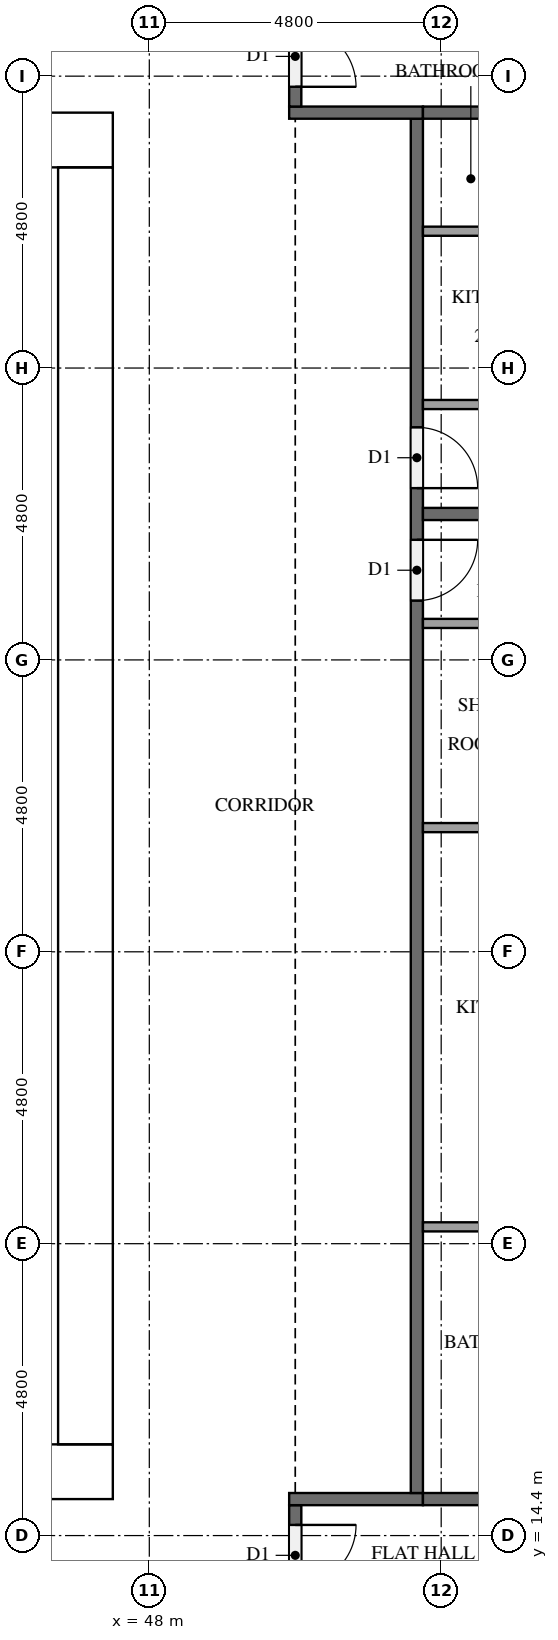
"""IFC4 building model, lengths in metres.
Left out: names, types, materials, properties, quantities, classifications, styles, units other than length and angle.
Written with IfcOpenShell. Run it as: python <this file> out.ifc"""

import sys

from ifc_helpers import new_model, si_unit, direction, frame, frame_2d, origin, place, context, subcontext, project, spatial, rectangle, extrude, element, fill, save


model = new_model("IFC4")
c1 = context("Model", 3, precision=1e-05, world=origin(), true_north=direction((0.0, 1.0)))
c2 = subcontext(c1, "Body", "Model", "MODEL_VIEW")
j1 = project(units=[si_unit("LENGTHUNIT", "METRE"), si_unit("PLANEANGLEUNIT", "RADIAN")], contexts=[c1])
p1 = place(None, origin())
s1 = spatial("IfcSite", under=j1, at=p1, CompositionType="ELEMENT")
p2 = place(p1, origin())
s2 = spatial("IfcBuilding", under=s1, at=p2, CompositionType="ELEMENT")
p3 = place(p2, frame((0.0, 0.0, 103.2)))
s3 = spatial("IfcBuildingStorey", under=s2, at=p3, CompositionType="ELEMENT", Elevation=103.2)
p4 = place(p3, frame((15.0, 15.45, 0.0), z_axis=(0.0, 0.0, 1.0), x_axis=(1.0, 0.0, 0.0)))
e1 = element("IfcWall", 1, at=p4, inside=s3, PredefinedType="SHEAR", context=c2, shape_type="SweptSolid", body=[
    extrude(rectangle(XDim=32.4, YDim=0.9, at=frame_2d((16.2, 0.0))), origin(), (0.0, 0.0, 1.0), 3.2),
])
p5 = place(p4, frame((15.3, 0.0, 0.0)))
e2 = element("IfcOpeningElement", 2, at=p5, cuts=e1, PredefinedType="OPENING", context=c2, shape_type="SweptSolid", body=[
    extrude(rectangle(XDim=1.8, YDim=2.1, at=frame_2d((0.9, 1.05))), frame((0.0, 0.46, 0.0), z_axis=(0.0, -1.0, 0.0), x_axis=(1.0, 0.0, 0.0)), (0.0, 0.0, 1.0), 0.92),
])
p6 = place(p3, frame((15.0, 37.35, 0.0), z_axis=(0.0, 0.0, 1.0), x_axis=(1.0, 0.0, 0.0)))
e3 = element("IfcWall", 3, at=p6, inside=s3, PredefinedType="SHEAR", context=c2, shape_type="SweptSolid", body=[
    extrude(rectangle(XDim=32.4, YDim=0.9, at=frame_2d((16.2, 0.0))), origin(), (0.0, 0.0, 1.0), 3.2),
])
p7 = place(p6, frame((15.3, 0.0, 0.0)))
e4 = element("IfcOpeningElement", 4, at=p7, cuts=e3, PredefinedType="OPENING", context=c2, shape_type="SweptSolid", body=[
    extrude(rectangle(XDim=1.8, YDim=2.1, at=frame_2d((0.9, 1.05))), frame((0.0, 0.46, 0.0), z_axis=(0.0, -1.0, 0.0), x_axis=(1.0, 0.0, 0.0)), (0.0, 0.0, 1.0), 0.92),
])
p8 = place(p6, frame((1.794, 0.0, 0.0)))
e5 = element("IfcOpeningElement", 5, at=p8, cuts=e3, PredefinedType="OPENING", context=c2, shape_type="SweptSolid", body=[
    extrude(rectangle(XDim=1.0, YDim=2.1, at=frame_2d((0.5, 1.05))), frame((0.0, 0.46, 0.0), z_axis=(0.0, -1.0, 0.0), x_axis=(1.0, 0.0, 0.0)), (0.0, 0.0, 1.0), 0.92),
])
p9 = place(p6, frame((5.331, 0.0, 0.0)))
e6 = element("IfcOpeningElement", 6, at=p9, cuts=e3, PredefinedType="OPENING", context=c2, shape_type="SweptSolid", body=[
    extrude(rectangle(XDim=1.0, YDim=2.1, at=frame_2d((0.5, 1.05))), frame((0.0, 0.46, 0.0), z_axis=(0.0, -1.0, 0.0), x_axis=(1.0, 0.0, 0.0)), (0.0, 0.0, 1.0), 0.92),
])
p10 = place(p3, frame((46.95, 15.9, 0.0), z_axis=(0.0, 0.0, 1.0), x_axis=(0.0, 1.0, 0.0)))
e7 = element("IfcWall", 7, at=p10, inside=s3, PredefinedType="SHEAR", context=c2, shape_type="SweptSolid", body=[
    extrude(rectangle(XDim=21.0, YDim=0.9, at=frame_2d((10.5, 0.0))), origin(), (0.0, 0.0, 1.0), 3.2),
])
p11 = place(p10, frame((10.2, 0.0, 0.0)))
e8 = element("IfcOpeningElement", 8, at=p11, cuts=e7, PredefinedType="OPENING", context=c2, shape_type="SweptSolid", body=[
    extrude(rectangle(XDim=1.2, YDim=2.1, at=frame_2d((0.6, 1.05))), frame((0.0, 0.46, 0.0), z_axis=(0.0, -1.0, 0.0), x_axis=(1.0, 0.0, 0.0)), (0.0, 0.0, 1.0), 0.92),
])
p12 = place(p3, frame((50.4, 14.9, 0.0), z_axis=(0.0, 0.0, 1.0), x_axis=(0.0, -1.0, 0.0)))
e9 = element("IfcWall", 9, at=p12, inside=s3, PredefinedType="PARTITIONING", context=c2, shape_type="SweptSolid", body=[
    extrude(rectangle(XDim=2.8, YDim=0.2, at=frame_2d((1.4, 0.0))), origin(), (0.0, 0.0, 1.0), 3.2),
])
p13 = place(p12, frame((0.325, 0.0, 0.0)))
e10 = element("IfcOpeningElement", 10, at=p13, cuts=e9, PredefinedType="OPENING", context=c2, shape_type="SweptSolid", body=[
    extrude(rectangle(XDim=1.0, YDim=2.1, at=frame_2d((0.5, 1.05))), frame((0.0, 0.11, 0.0), z_axis=(0.0, -1.0, 0.0), x_axis=(1.0, 0.0, 0.0)), (0.0, 0.0, 1.0), 0.22),
])
p14 = place(p3, frame((50.3, 15.0, 0.0), z_axis=(0.0, 0.0, 1.0), x_axis=(1.0, 0.0, 0.0)))
e11 = element("IfcWall", 11, at=p14, inside=s3, PredefinedType="PARTITIONING", context=c2, shape_type="SweptSolid", body=[
    extrude(rectangle(XDim=2.2, YDim=0.2, at=frame_2d((1.1, 0.0))), origin(), (0.0, 0.0, 1.0), 3.2),
])
p15 = place(p3, frame((52.4, 37.7, 0.0), z_axis=(0.0, 0.0, 1.0), x_axis=(0.0, -1.0, 0.0)))
e12 = element("IfcWall", 12, at=p15, inside=s3, PredefinedType="PARTITIONING", context=c2, shape_type="SweptSolid", body=[
    extrude(rectangle(XDim=22.6, YDim=0.2, at=frame_2d((11.3, 0.0))), origin(), (0.0, 0.0, 1.0), 3.2),
])
p16 = place(p15, frame((6.925, 0.0, 0.0)))
e13 = element("IfcOpeningElement", 13, at=p16, cuts=e12, PredefinedType="OPENING", context=c2, shape_type="SweptSolid", body=[
    extrude(rectangle(XDim=1.0, YDim=2.1, at=frame_2d((0.5, 1.05))), frame((0.0, 0.11, 0.0), z_axis=(0.0, -1.0, 0.0), x_axis=(1.0, 0.0, 0.0)), (0.0, 0.0, 1.0), 0.22),
])
p17 = place(p15, frame((5.075, 0.0, 0.0)))
e14 = element("IfcOpeningElement", 14, at=p17, cuts=e12, PredefinedType="OPENING", context=c2, shape_type="SweptSolid", body=[
    extrude(rectangle(XDim=1.0, YDim=2.1, at=frame_2d((0.5, 1.05))), frame((0.0, 0.11, 0.0), z_axis=(0.0, -1.0, 0.0), x_axis=(1.0, 0.0, 0.0)), (0.0, 0.0, 1.0), 0.22),
])
p18 = place(p3, frame((52.5, 37.8, 0.0), z_axis=(0.0, 0.0, 1.0), x_axis=(-1.0, 0.0, 0.0)))
e15 = element("IfcWall", 15, at=p18, inside=s3, PredefinedType="PARTITIONING", context=c2, shape_type="SweptSolid", body=[
    extrude(rectangle(XDim=2.2, YDim=0.2, at=frame_2d((1.1, 0.0))), origin(), (0.0, 0.0, 1.0), 3.2),
])
p19 = place(p3, frame((50.4, 40.7, 0.0), z_axis=(0.0, 0.0, 1.0), x_axis=(0.0, -1.0, 0.0)))
e16 = element("IfcWall", 16, at=p19, inside=s3, PredefinedType="PARTITIONING", context=c2, shape_type="SweptSolid", body=[
    extrude(rectangle(XDim=2.8, YDim=0.2, at=frame_2d((1.4, 0.0))), origin(), (0.0, 0.0, 1.0), 3.2),
])
p20 = place(p19, frame((1.475, 0.0, 0.0)))
e17 = element("IfcOpeningElement", 17, at=p20, cuts=e16, PredefinedType="OPENING", context=c2, shape_type="SweptSolid", body=[
    extrude(rectangle(XDim=1.0, YDim=2.1, at=frame_2d((0.5, 1.05))), frame((0.0, 0.11, 0.0), z_axis=(0.0, -1.0, 0.0), x_axis=(1.0, 0.0, 0.0)), (0.0, 0.0, 1.0), 0.22),
])
for number, where, z_axis, x_axis in (
    (18, (52.5, 15.0, 0.0), (0.0, 0.0, 1.0), (1.0, 0.0, 0.0)),
    (19, (52.5, 31.2, 0.0), (0.0, 0.0, 1.0), (1.0, 0.0, 0.0)),
):
    element("IfcWall", number, at=place(p3, frame(where, z_axis=z_axis, x_axis=x_axis)), inside=s3, PredefinedType="PARTITIONING", context=c2, shape_type="SweptSolid", body=[
        extrude(rectangle(XDim=9.8, YDim=0.2, at=frame_2d((4.9, 0.0))), origin(), (0.0, 0.0, 1.0), 3.2),
    ])
p21 = place(p3, frame((52.5, 37.8, 0.0), z_axis=(0.0, 0.0, 1.0), x_axis=(1.0, 0.0, 0.0)))
e20 = element("IfcWall", 20, at=p21, inside=s3, PredefinedType="PARTITIONING", context=c2, shape_type="SweptSolid", body=[
    extrude(rectangle(XDim=9.475, YDim=0.2, at=frame_2d((4.738, 0.0))), origin(), (0.0, 0.0, 1.0), 3.2),
])
for number, where, z_axis, x_axis in (
    (21, (52.5, 26.042, 0.0), (0.0, 0.0, 1.0), (1.0, 0.0, 0.0)),
    (22, (52.5, 19.477, 0.0), (0.0, 0.0, 1.0), (1.0, 0.0, 0.0)),
):
    element("IfcWall", number, at=place(p3, frame(where, z_axis=z_axis, x_axis=x_axis)), inside=s3, PredefinedType="PARTITIONING", context=c2, shape_type="SweptSolid", body=[
        extrude(rectangle(XDim=2.475, YDim=0.15, at=frame_2d((1.238, 0.0))), origin(), (0.0, 0.0, 1.0), 3.2),
    ])
p22 = place(p3, frame((52.5, 29.4, 0.0), z_axis=(0.0, 0.0, 1.0), x_axis=(1.0, 0.0, 0.0)))
e23 = element("IfcWall", 23, at=p22, inside=s3, PredefinedType="PARTITIONING", context=c2, shape_type="SweptSolid", body=[
    extrude(rectangle(XDim=2.625, YDim=0.15, at=frame_2d((1.312, 0.0))), origin(), (0.0, 0.0, 1.0), 3.2),
])
p23 = place(p3, frame((52.5, 35.85, 0.0), z_axis=(0.0, 0.0, 1.0), x_axis=(1.0, 0.0, 0.0)))
e24 = element("IfcWall", 24, at=p23, inside=s3, PredefinedType="PARTITIONING", context=c2, shape_type="SweptSolid", body=[
    extrude(rectangle(XDim=2.325, YDim=0.15, at=frame_2d((1.163, 0.0))), origin(), (0.0, 0.0, 1.0), 3.2),
])
p24 = place(p3, frame((52.5, 33.0, 0.0), z_axis=(0.0, 0.0, 1.0), x_axis=(1.0, 0.0, 0.0)))
e25 = element("IfcWall", 25, at=p24, inside=s3, PredefinedType="PARTITIONING", context=c2, shape_type="SweptSolid", body=[
    extrude(rectangle(XDim=2.475, YDim=0.15, at=frame_2d((1.238, 0.0))), origin(), (0.0, 0.0, 1.0), 3.2),
])
p25 = place(p11, origin())
e26 = element("IfcDoor", 26, at=p25, inside=s3, OperationType="SINGLE_SWING_RIGHT", PredefinedType="DOOR", context=c2, shape_type="SweptSolid", body=[
    extrude(rectangle(XDim=1.2, YDim=2.1, at=frame_2d((0.6, 1.05))), frame((0.0, 0.025, 0.0), z_axis=(0.0, -1.0, 0.0), x_axis=(1.0, 0.0, 0.0)), (0.0, 0.0, 1.0), 0.05),
])
fill(e8, e26)
p26 = place(p13, origin())
e27 = element("IfcDoor", 27, at=p26, inside=s3, OperationType="SINGLE_SWING_LEFT", PredefinedType="DOOR", context=c2, shape_type="SweptSolid", body=[
    extrude(rectangle(XDim=1.0, YDim=2.1, at=frame_2d((0.5, 1.05))), frame((0.0, 0.025, 0.0), z_axis=(0.0, -1.0, 0.0), x_axis=(1.0, 0.0, 0.0)), (0.0, 0.0, 1.0), 0.05),
])
fill(e10, e27)
p27 = place(p16, origin())
e28 = element("IfcDoor", 28, at=p27, inside=s3, OperationType="SINGLE_SWING_LEFT", PredefinedType="DOOR", context=c2, shape_type="SweptSolid", body=[
    extrude(rectangle(XDim=1.0, YDim=2.1, at=frame_2d((0.5, 1.05))), frame((0.0, 0.025, 0.0), z_axis=(0.0, -1.0, 0.0), x_axis=(1.0, 0.0, 0.0)), (0.0, 0.0, 1.0), 0.05),
])
fill(e13, e28)
p28 = place(p17, origin())
e29 = element("IfcDoor", 29, at=p28, inside=s3, OperationType="SINGLE_SWING_RIGHT", PredefinedType="DOOR", context=c2, shape_type="SweptSolid", body=[
    extrude(rectangle(XDim=1.0, YDim=2.1, at=frame_2d((0.5, 1.05))), frame((0.0, 0.025, 0.0), z_axis=(0.0, -1.0, 0.0), x_axis=(1.0, 0.0, 0.0)), (0.0, 0.0, 1.0), 0.05),
])
fill(e14, e29)
p29 = place(p20, origin())
e30 = element("IfcDoor", 30, at=p29, inside=s3, OperationType="SINGLE_SWING_RIGHT", PredefinedType="DOOR", context=c2, shape_type="SweptSolid", body=[
    extrude(rectangle(XDim=1.0, YDim=2.1, at=frame_2d((0.5, 1.05))), frame((0.0, 0.025, 0.0), z_axis=(0.0, -1.0, 0.0), x_axis=(1.0, 0.0, 0.0)), (0.0, 0.0, 1.0), 0.05),
])
fill(e17, e30)
save(model, sys.argv[1])
